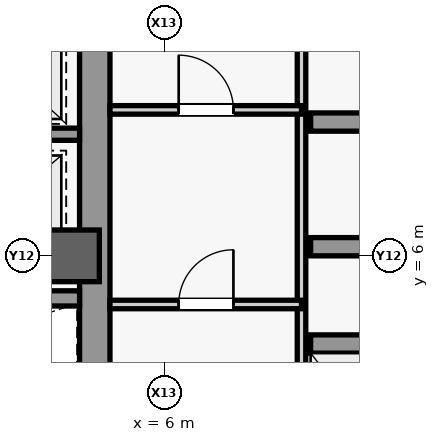
"""IFC4 building model, lengths in metres.
Left out: names, types, materials, properties, quantities, classifications, styles, units other than length and angle.
Written with IfcOpenShell. Run it as: python <this file> out.ifc"""

import sys

from ifc_helpers import new_model, si_unit, direction, frame, frame_2d, origin, origin_2d, place, context, subcontext, project, spatial, rectangle, extrude, source, transform, mapped, element, fill, save


model = new_model("IFC4")
c1 = context("Model", 3, precision=1e-05, world=origin(), true_north=direction((0.0, 1.0)))
c2 = subcontext(c1, "Body", "Model", "MODEL_VIEW")
j1 = project(units=[si_unit("LENGTHUNIT", "METRE"), si_unit("PLANEANGLEUNIT", "RADIAN")], contexts=[c1])
p1 = place(None, origin())
s1 = spatial("IfcSite", under=j1, at=p1, CompositionType="ELEMENT")
p2 = place(p1, origin())
s2 = spatial("IfcBuilding", under=s1, at=p2, CompositionType="ELEMENT")
p3 = place(p2, frame((0.0, 0.0, 259.1)))
s3 = spatial("IfcBuildingStorey", under=s2, at=p3, CompositionType="ELEMENT", Elevation=259.1)
m1 = source(origin(), c2, "Body", "SweptSolid", [
    extrude(rectangle(XDim=21.4, YDim=0.5, at=frame_2d((10.7, 0.0))), origin(), (0.0, 0.0, 1.0), 3.78),
])
p4 = place(p3, frame((4.85, -10.7, 0.0), z_axis=(0.0, 0.0, 1.0), x_axis=(0.0, 1.0, 0.0)))
e1 = element("IfcWall", 1, at=p4, inside=s3, PredefinedType="SHEAR", context=c2, shape_type="MappedRepresentation", body=[
    mapped(m1, transform((0.0, 0.0, 0.0), scale=1.0)),
])
m2 = source(origin(), c2, "Body", "SweptSolid", [
    extrude(rectangle(XDim=0.85, YDim=0.85, at=origin_2d()), origin(), (0.0, 0.0, 1.0), 4.0),
])
p5 = place(p3, frame((4.5, 6.0, 0.0), z_axis=(0.0, 0.0, 1.0), x_axis=(1.0, 0.0, 0.0)))
e2 = element("IfcColumn", 2, at=p5, inside=s3, PredefinedType="COLUMN", context=c2, shape_type="MappedRepresentation", body=[
    mapped(m2, transform((0.0, 0.0, 0.0), scale=1.0)),
])
m3 = source(origin(), c2, "Body", "SweptSolid", [
    extrude(rectangle(XDim=2.3, YDim=0.3, at=frame_2d((1.15, 0.0))), origin(), (0.0, 0.0, 1.0), 3.78),
])
for number, where, z_axis, x_axis in (
    (3, (8.4, 4.55, 0.0), (0.0, 0.0, 1.0), (1.0, 0.0, 0.0)),
    (4, (8.4, 6.15, 0.0), (0.0, 0.0, 1.0), (1.0, 0.0, 0.0)),
    (5, (8.4, 8.2, 0.0), (0.0, 0.0, 1.0), (1.0, 0.0, 0.0)),
):
    element("IfcWall", number, at=place(p3, frame(where, z_axis=z_axis, x_axis=x_axis)), inside=s3, PredefinedType="SHEAR", context=c2, shape_type="MappedRepresentation", body=[
        mapped(m3, transform((0.0, 0.0, 0.0), scale=1.0)),
    ])
m4 = source(origin(), c2, "Body", "SweptSolid", [
    extrude(rectangle(XDim=9.4, YDim=0.14, at=frame_2d((4.7, 0.0))), origin(), (0.0, 0.0, 1.0), 3.78),
])
p6 = place(p3, frame((8.25, 1.3, 0.0), z_axis=(0.0, 0.0, 1.0), x_axis=(0.0, 1.0, 0.0)))
e6 = element("IfcWall", 6, at=p6, inside=s3, PredefinedType="PARTITIONING", context=c2, shape_type="MappedRepresentation", body=[
    mapped(m4, transform((0.0, 0.0, 0.0), scale=1.0)),
])
m5 = source(origin(), c2, "Body", "SweptSolid", [
    extrude(rectangle(XDim=3.15, YDim=0.14, at=frame_2d((1.575, 0.0))), origin(), (0.0, 0.0, 1.0), 3.78),
])
p7 = place(p3, frame((5.1, 8.4, 0.0), z_axis=(0.0, 0.0, 1.0), x_axis=(1.0, 0.0, 0.0)))
e7 = element("IfcWall", 7, at=p7, inside=s3, PredefinedType="PARTITIONING", context=c2, shape_type="MappedRepresentation", body=[
    mapped(m5, transform((0.0, 0.0, 0.0), scale=1.0)),
])
m6 = source(origin(), c2, "Body", "SweptSolid", [
    extrude(rectangle(XDim=0.9, YDim=2.15, at=frame_2d((0.45, 1.075))), frame((0.0, 0.08, 0.0), z_axis=(0.0, -1.0, 0.0), x_axis=(1.0, 0.0, 0.0)), (0.0, 0.0, 1.0), 0.16),
])
p8 = place(p7, frame((1.13, 0.0, 0.0)))
e8 = element("IfcOpeningElement", 8, at=p8, cuts=e7, PredefinedType="OPENING", context=c2, shape_type="MappedRepresentation", body=[
    mapped(m6, transform((0.0, 0.0, 0.0), scale=1.0)),
])
p9 = place(p3, frame((5.1, 5.2, 0.0), z_axis=(0.0, 0.0, 1.0), x_axis=(1.0, 0.0, 0.0)))
e9 = element("IfcWall", 9, at=p9, inside=s3, PredefinedType="PARTITIONING", context=c2, shape_type="MappedRepresentation", body=[
    mapped(m5, transform((0.0, 0.0, 0.0), scale=1.0)),
])
p10 = place(p9, frame((1.13, 0.0, 0.0)))
e10 = element("IfcOpeningElement", 10, at=p10, cuts=e9, PredefinedType="OPENING", context=c2, shape_type="MappedRepresentation", body=[
    mapped(m6, transform((0.0, 0.0, 0.0), scale=1.0)),
])
m7 = source(origin(), c2, "Body", "SweptSolid", [
    extrude(rectangle(XDim=2.45, YDim=0.2, at=frame_2d((1.225, 0.0))), origin(), (0.0, 0.0, 1.0), 3.78),
])
p11 = place(p3, frame((2.15, 8.0, 0.0), z_axis=(0.0, 0.0, 1.0), x_axis=(1.0, 0.0, 0.0)))
e11 = element("IfcWall", 11, at=p11, inside=s3, PredefinedType="SHEAR", context=c2, shape_type="MappedRepresentation", body=[
    mapped(m7, transform((0.0, 0.0, 0.0), scale=1.0)),
])
m8 = source(origin(), c2, "Body", "SweptSolid", [
    extrude(rectangle(XDim=9.2, YDim=0.25, at=frame_2d((4.6, 0.0))), origin(), (0.0, 0.0, 1.0), 3.78),
])
p12 = place(p3, frame((-4.6, 5.3, 0.0), z_axis=(0.0, 0.0, 1.0), x_axis=(1.0, 0.0, 0.0)))
e12 = element("IfcWall", 12, at=p12, inside=s3, PredefinedType="SHEAR", context=c2, shape_type="MappedRepresentation", body=[
    mapped(m8, transform((0.0, 0.0, 0.0), scale=1.0)),
])
m9 = source(origin(), c2, "Body", "SweptSolid", [
    extrude(rectangle(XDim=1.05, YDim=2.2, at=frame_2d((0.525, 1.1))), frame((0.0, 0.135, 0.0), z_axis=(0.0, -1.0, 0.0), x_axis=(1.0, 0.0, 0.0)), (0.0, 0.0, 1.0), 0.27),
])
p13 = place(p12, frame((4.075, 0.0, 0.0)))
e13 = element("IfcOpeningElement", 13, at=p13, cuts=e12, PredefinedType="OPENING", context=c2, shape_type="MappedRepresentation", body=[
    mapped(m9, transform((0.0, 0.0, 0.0), scale=1.0)),
])
m10 = source(origin(), c2, "Body", "SweptSolid", [
    extrude(rectangle(XDim=0.9, YDim=2.15, at=frame_2d((0.45, 1.075))), frame((0.0, 0.025, 0.0), z_axis=(0.0, -1.0, 0.0), x_axis=(1.0, 0.0, 0.0)), (0.0, 0.0, 1.0), 0.05),
])
p14 = place(p8, origin())
e14 = element("IfcDoor", 14, at=p14, inside=s3, OperationType="SINGLE_SWING_LEFT", PredefinedType="DOOR", context=c2, shape_type="MappedRepresentation", body=[
    mapped(m10, transform((0.0, 0.0, 0.0), scale=1.0)),
])
fill(e8, e14)
p15 = place(p10, origin())
e15 = element("IfcDoor", 15, at=p15, inside=s3, OperationType="SINGLE_SWING_RIGHT", PredefinedType="DOOR", context=c2, shape_type="MappedRepresentation", body=[
    mapped(m10, transform((0.0, 0.0, 0.0), scale=1.0)),
])
fill(e10, e15)
save(model, sys.argv[1])
